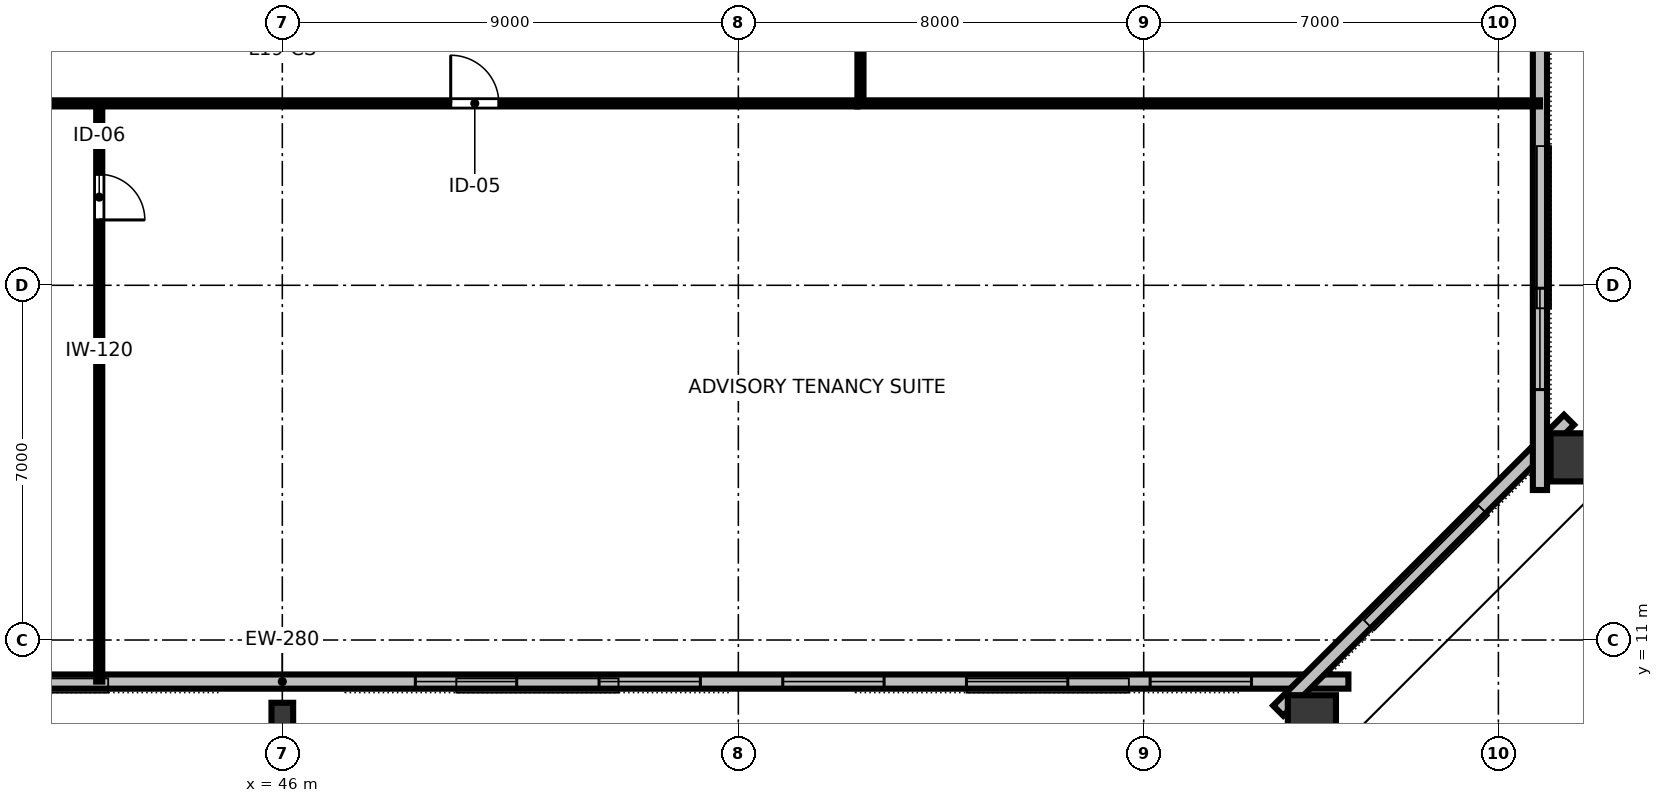
"""IFC4 building model, lengths in metres.
Left out: names, types, materials, properties, quantities, classifications, styles, units other than length and angle.
Written with IfcOpenShell. Run it as: python <this file> out.ifc"""

import sys

from ifc_helpers import new_model, si_unit, direction, frame, frame_2d, origin, origin_2d, place, context, subcontext, project, spatial, rectangle, hollow_rectangle, i_section, extrude, element, fill, save


model = new_model("IFC4")
c1 = context("Model", 3, precision=1e-05, world=origin(), true_north=direction((0.0, 1.0)))
c2 = subcontext(c1, "Body", "Model", "MODEL_VIEW")
j1 = project(units=[si_unit("LENGTHUNIT", "METRE"), si_unit("PLANEANGLEUNIT", "RADIAN")], contexts=[c1])
p1 = place(None, origin())
s1 = spatial("IfcSite", under=j1, at=p1, CompositionType="ELEMENT")
p2 = place(p1, origin())
s2 = spatial("IfcBuilding", under=s1, at=p2, CompositionType="ELEMENT")
p3 = place(p2, frame((0.0, 0.0, 74.8)))
s3 = spatial("IfcBuildingStorey", under=s2, at=p3, CompositionType="ELEMENT", Elevation=74.8)
p4 = place(p3, frame((46.0, 9.52, 0.0), z_axis=(0.0, 0.0, 1.0), x_axis=(1.0, 0.0, 0.0)))
e1 = element("IfcColumn", 1, at=p4, inside=s3, PredefinedType="COLUMN", context=c2, shape_type="SweptSolid", body=[
    extrude(i_section(OverallWidth=0.428, OverallDepth=0.483, WebThickness=0.051, FlangeThickness=0.082, FilletRadius=0.025, at=origin_2d()), origin(), (0.0, 0.0, 1.0), 3.358),
])
for number, where, z_axis, x_axis in (
    (2, (66.319, 9.336, 0.0), (0.0, 0.0, 1.0), (1.0, 0.0, 0.0)),
    (3, (71.604, 14.604, 0.0), (0.0, 0.0, 1.0), (0.0, 1.0, 0.0)),
):
    element("IfcColumn", number, at=place(p3, frame(where, z_axis=z_axis, x_axis=x_axis)), inside=s3, PredefinedType="COLUMN", context=c2, shape_type="SweptSolid", body=[
        extrude(hollow_rectangle(XDim=0.95, YDim=1.15, WallThickness=0.06, at=origin_2d()), origin(), (0.0, 0.0, 1.0), 3.358),
    ])
p5 = place(p3, frame((24.96, 10.18, 0.0), z_axis=(0.0, 0.0, 1.0), x_axis=(1.0, 0.0, 0.0)))
e4 = element("IfcWall", 4, at=p5, inside=s3, PredefinedType="STANDARD", context=c2, shape_type="SweptSolid", body=[
    extrude(rectangle(XDim=42.08, YDim=0.28, at=frame_2d((21.04, 0.0))), origin(), (0.0, 0.0, 1.0), 3.36),
])
p6 = place(p5, frame((1.913, 0.0, 0.8)))
e5 = element("IfcOpeningElement", 5, at=p6, cuts=e4, PredefinedType="OPENING", context=c2, shape_type="SweptSolid", body=[
    extrude(rectangle(XDim=2.0, YDim=1.95, at=frame_2d((1.0, 0.975))), frame((0.0, 0.15, 0.0), z_axis=(0.0, -1.0, 0.0), x_axis=(1.0, 0.0, 0.0)), (0.0, 0.0, 1.0), 0.3),
])
p7 = place(p5, frame((5.538, 0.0, 0.8)))
e6 = element("IfcOpeningElement", 6, at=p7, cuts=e4, PredefinedType="OPENING", context=c2, shape_type="SweptSolid", body=[
    extrude(rectangle(XDim=2.0, YDim=1.95, at=frame_2d((1.0, 0.975))), frame((0.0, 0.15, 0.0), z_axis=(0.0, -1.0, 0.0), x_axis=(1.0, 0.0, 0.0)), (0.0, 0.0, 1.0), 0.3),
])
p8 = place(p5, frame((9.164, 0.0, 0.8)))
e7 = element("IfcOpeningElement", 7, at=p8, cuts=e4, PredefinedType="OPENING", context=c2, shape_type="SweptSolid", body=[
    extrude(rectangle(XDim=2.0, YDim=1.95, at=frame_2d((1.0, 0.975))), frame((0.0, 0.15, 0.0), z_axis=(0.0, -1.0, 0.0), x_axis=(1.0, 0.0, 0.0)), (0.0, 0.0, 1.0), 0.3),
])
p9 = place(p5, frame((12.789, 0.0, 0.8)))
e8 = element("IfcOpeningElement", 8, at=p9, cuts=e4, PredefinedType="OPENING", context=c2, shape_type="SweptSolid", body=[
    extrude(rectangle(XDim=2.0, YDim=1.95, at=frame_2d((1.0, 0.975))), frame((0.0, 0.15, 0.0), z_axis=(0.0, -1.0, 0.0), x_axis=(1.0, 0.0, 0.0)), (0.0, 0.0, 1.0), 0.3),
])
p10 = place(p5, frame((23.666, 0.0, 0.8)))
e9 = element("IfcOpeningElement", 9, at=p10, cuts=e4, PredefinedType="OPENING", context=c2, shape_type="SweptSolid", body=[
    extrude(rectangle(XDim=2.0, YDim=1.95, at=frame_2d((1.0, 0.975))), frame((0.0, 0.15, 0.0), z_axis=(0.0, -1.0, 0.0), x_axis=(1.0, 0.0, 0.0)), (0.0, 0.0, 1.0), 0.3),
])
p11 = place(p5, frame((27.291, 0.0, 0.8)))
e10 = element("IfcOpeningElement", 10, at=p11, cuts=e4, PredefinedType="OPENING", context=c2, shape_type="SweptSolid", body=[
    extrude(rectangle(XDim=2.0, YDim=1.95, at=frame_2d((1.0, 0.975))), frame((0.0, 0.15, 0.0), z_axis=(0.0, -1.0, 0.0), x_axis=(1.0, 0.0, 0.0)), (0.0, 0.0, 1.0), 0.3),
])
p12 = place(p5, frame((30.917, 0.0, 0.8)))
e11 = element("IfcOpeningElement", 11, at=p12, cuts=e4, PredefinedType="OPENING", context=c2, shape_type="SweptSolid", body=[
    extrude(rectangle(XDim=2.0, YDim=1.95, at=frame_2d((1.0, 0.975))), frame((0.0, 0.15, 0.0), z_axis=(0.0, -1.0, 0.0), x_axis=(1.0, 0.0, 0.0)), (0.0, 0.0, 1.0), 0.3),
])
p13 = place(p5, frame((34.542, 0.0, 0.8)))
e12 = element("IfcOpeningElement", 12, at=p13, cuts=e4, PredefinedType="OPENING", context=c2, shape_type="SweptSolid", body=[
    extrude(rectangle(XDim=2.0, YDim=1.95, at=frame_2d((1.0, 0.975))), frame((0.0, 0.15, 0.0), z_axis=(0.0, -1.0, 0.0), x_axis=(1.0, 0.0, 0.0)), (0.0, 0.0, 1.0), 0.3),
])
p14 = place(p5, frame((38.167, 0.0, 0.8)))
e13 = element("IfcOpeningElement", 13, at=p14, cuts=e4, PredefinedType="OPENING", context=c2, shape_type="SweptSolid", body=[
    extrude(rectangle(XDim=2.0, YDim=1.95, at=frame_2d((1.0, 0.975))), frame((0.0, 0.15, 0.0), z_axis=(0.0, -1.0, 0.0), x_axis=(1.0, 0.0, 0.0)), (0.0, 0.0, 1.0), 0.3),
])
p15 = place(p3, frame((65.655, 9.606, 0.0), z_axis=(0.0, 0.0, 1.0), x_axis=(0.707106781187, 0.707106781187, 0.0)))
e14 = element("IfcWall", 14, at=p15, inside=s3, PredefinedType="STANDARD", context=c2, shape_type="SweptSolid", body=[
    extrude(rectangle(XDim=8.116, YDim=0.28, at=frame_2d((4.058, 0.0))), origin(), (0.0, 0.0, 1.0), 3.36),
])
p16 = place(p3, frame((70.82, 13.96, 0.0), z_axis=(0.0, 0.0, 1.0), x_axis=(0.0, 1.0, 0.0)))
e15 = element("IfcWall", 15, at=p16, inside=s3, PredefinedType="STANDARD", context=c2, shape_type="SweptSolid", body=[
    extrude(rectangle(XDim=36.08, YDim=0.28, at=frame_2d((18.04, 0.0))), origin(), (0.0, 0.0, 1.0), 3.36),
])
p17 = place(p16, frame((1.982, 0.0, 0.8)))
e16 = element("IfcOpeningElement", 16, at=p17, cuts=e15, PredefinedType="OPENING", context=c2, shape_type="SweptSolid", body=[
    extrude(rectangle(XDim=2.0, YDim=1.95, at=frame_2d((1.0, 0.975))), frame((0.0, 0.15, 0.0), z_axis=(0.0, -1.0, 0.0), x_axis=(1.0, 0.0, 0.0)), (0.0, 0.0, 1.0), 0.3),
])
p18 = place(p16, frame((9.511, 0.0, 0.8)))
e17 = element("IfcOpeningElement", 17, at=p18, cuts=e15, PredefinedType="OPENING", context=c2, shape_type="SweptSolid", body=[
    extrude(rectangle(XDim=2.0, YDim=1.95, at=frame_2d((1.0, 0.975))), frame((0.0, 0.15, 0.0), z_axis=(0.0, -1.0, 0.0), x_axis=(1.0, 0.0, 0.0)), (0.0, 0.0, 1.0), 0.3),
])
p19 = place(p16, frame((13.276, 0.0, 0.8)))
e18 = element("IfcOpeningElement", 18, at=p19, cuts=e15, PredefinedType="OPENING", context=c2, shape_type="SweptSolid", body=[
    extrude(rectangle(XDim=2.0, YDim=1.95, at=frame_2d((1.0, 0.975))), frame((0.0, 0.15, 0.0), z_axis=(0.0, -1.0, 0.0), x_axis=(1.0, 0.0, 0.0)), (0.0, 0.0, 1.0), 0.3),
])
p20 = place(p16, frame((20.804, 0.0, 0.8)))
e19 = element("IfcOpeningElement", 19, at=p20, cuts=e15, PredefinedType="OPENING", context=c2, shape_type="SweptSolid", body=[
    extrude(rectangle(XDim=2.0, YDim=1.95, at=frame_2d((1.0, 0.975))), frame((0.0, 0.15, 0.0), z_axis=(0.0, -1.0, 0.0), x_axis=(1.0, 0.0, 0.0)), (0.0, 0.0, 1.0), 0.3),
])
p21 = place(p16, frame((24.569, 0.0, 0.8)))
e20 = element("IfcOpeningElement", 20, at=p21, cuts=e15, PredefinedType="OPENING", context=c2, shape_type="SweptSolid", body=[
    extrude(rectangle(XDim=2.0, YDim=1.95, at=frame_2d((1.0, 0.975))), frame((0.0, 0.15, 0.0), z_axis=(0.0, -1.0, 0.0), x_axis=(1.0, 0.0, 0.0)), (0.0, 0.0, 1.0), 0.3),
])
p22 = place(p16, frame((32.098, 0.0, 0.8)))
e21 = element("IfcOpeningElement", 21, at=p22, cuts=e15, PredefinedType="OPENING", context=c2, shape_type="SweptSolid", body=[
    extrude(rectangle(XDim=2.0, YDim=1.95, at=frame_2d((1.0, 0.975))), frame((0.0, 0.15, 0.0), z_axis=(0.0, -1.0, 0.0), x_axis=(1.0, 0.0, 0.0)), (0.0, 0.0, 1.0), 0.3),
])
p23 = place(p3, frame((42.387, 21.59, 0.0), z_axis=(0.0, 0.0, 1.0), x_axis=(0.0, -1.0, 0.0)))
e22 = element("IfcWall", 22, at=p23, inside=s3, PredefinedType="PARTITIONING", context=c2, shape_type="SweptSolid", body=[
    extrude(rectangle(XDim=11.41, YDim=0.12, at=frame_2d((5.705, 0.0))), origin(), (0.0, 0.0, 1.0), 2.64),
])
p24 = place(p23, frame((1.4, 0.0, 0.0)))
e23 = element("IfcOpeningElement", 23, at=p24, cuts=e22, PredefinedType="OPENING", context=c2, shape_type="SweptSolid", body=[
    extrude(rectangle(XDim=0.9, YDim=2.15, at=frame_2d((0.45, 1.075))), frame((0.0, 0.07, 0.0), z_axis=(0.0, -1.0, 0.0), x_axis=(1.0, 0.0, 0.0)), (0.0, 0.0, 1.0), 0.14),
])
p25 = place(p3, frame((34.65, 21.59, 0.0), z_axis=(0.0, 0.0, 1.0), x_axis=(1.0, 0.0, 0.0)))
e24 = element("IfcWall", 24, at=p25, inside=s3, PredefinedType="PARTITIONING", context=c2, shape_type="SweptSolid", body=[
    extrude(rectangle(XDim=22.7, YDim=0.12, at=frame_2d((11.35, 0.0))), origin(), (0.0, 0.0, 1.0), 2.64),
])
p26 = place(p25, frame((3.463, 0.0, 0.0)))
e25 = element("IfcOpeningElement", 25, at=p26, cuts=e24, PredefinedType="OPENING", context=c2, shape_type="SweptSolid", body=[
    extrude(rectangle(XDim=0.95, YDim=2.15, at=frame_2d((0.475, 1.075))), frame((0.0, 0.07, 0.0), z_axis=(0.0, -1.0, 0.0), x_axis=(1.0, 0.0, 0.0)), (0.0, 0.0, 1.0), 0.14),
])
p27 = place(p25, frame((14.673, 0.0, 0.0)))
e26 = element("IfcOpeningElement", 26, at=p27, cuts=e24, PredefinedType="OPENING", context=c2, shape_type="SweptSolid", body=[
    extrude(rectangle(XDim=0.95, YDim=2.15, at=frame_2d((0.475, 1.075))), frame((0.0, 0.07, 0.0), z_axis=(0.0, -1.0, 0.0), x_axis=(1.0, 0.0, 0.0)), (0.0, 0.0, 1.0), 0.14),
])
p28 = place(p3, frame((57.41, 21.65, 0.0), z_axis=(0.0, 0.0, 1.0), x_axis=(0.0, 1.0, 0.0)))
e27 = element("IfcWall", 27, at=p28, inside=s3, PredefinedType="PARTITIONING", context=c2, shape_type="SweptSolid", body=[
    extrude(rectangle(XDim=20.7, YDim=0.12, at=frame_2d((10.35, 0.0))), origin(), (0.0, 0.0, 1.0), 2.64),
])
p29 = place(p28, frame((4.931, 0.0, 0.0)))
e28 = element("IfcOpeningElement", 28, at=p29, cuts=e27, PredefinedType="OPENING", context=c2, shape_type="SweptSolid", body=[
    extrude(rectangle(XDim=0.95, YDim=2.15, at=frame_2d((0.475, 1.075))), frame((0.0, 0.07, 0.0), z_axis=(0.0, -1.0, 0.0), x_axis=(1.0, 0.0, 0.0)), (0.0, 0.0, 1.0), 0.14),
])
p30 = place(p28, frame((15.081, 0.0, 0.0)))
e29 = element("IfcOpeningElement", 29, at=p30, cuts=e27, PredefinedType="OPENING", context=c2, shape_type="SweptSolid", body=[
    extrude(rectangle(XDim=0.95, YDim=2.15, at=frame_2d((0.475, 1.075))), frame((0.0, 0.07, 0.0), z_axis=(0.0, -1.0, 0.0), x_axis=(1.0, 0.0, 0.0)), (0.0, 0.0, 1.0), 0.14),
])
p31 = place(p3, frame((57.35, 21.59, 0.0), z_axis=(0.0, 0.0, 1.0), x_axis=(1.0, 0.0, 0.0)))
e30 = element("IfcWall", 30, at=p31, inside=s3, PredefinedType="PARTITIONING", context=c2, shape_type="SweptSolid", body=[
    extrude(rectangle(XDim=13.47, YDim=0.12, at=frame_2d((6.735, 0.0))), origin(), (0.0, 0.0, 1.0), 2.64),
])
p32 = place(p10, origin())
e31 = element("IfcWindow", 31, at=p32, inside=s3, PartitioningType="SINGLE_PANEL", PredefinedType="WINDOW", context=c2, shape_type="SweptSolid", body=[
    extrude(rectangle(XDim=2.0, YDim=1.95, at=frame_2d((1.0, 0.975))), frame((0.0, 0.03, 0.0), z_axis=(0.0, -1.0, 0.0), x_axis=(1.0, 0.0, 0.0)), (0.0, 0.0, 1.0), 0.06),
])
fill(e9, e31)
p33 = place(p11, origin())
e32 = element("IfcWindow", 32, at=p33, inside=s3, PartitioningType="SINGLE_PANEL", PredefinedType="WINDOW", context=c2, shape_type="SweptSolid", body=[
    extrude(rectangle(XDim=2.0, YDim=1.95, at=frame_2d((1.0, 0.975))), frame((0.0, 0.03, 0.0), z_axis=(0.0, -1.0, 0.0), x_axis=(1.0, 0.0, 0.0)), (0.0, 0.0, 1.0), 0.06),
])
fill(e10, e32)
p34 = place(p12, origin())
e33 = element("IfcWindow", 33, at=p34, inside=s3, PartitioningType="SINGLE_PANEL", PredefinedType="WINDOW", context=c2, shape_type="SweptSolid", body=[
    extrude(rectangle(XDim=2.0, YDim=1.95, at=frame_2d((1.0, 0.975))), frame((0.0, 0.03, 0.0), z_axis=(0.0, -1.0, 0.0), x_axis=(1.0, 0.0, 0.0)), (0.0, 0.0, 1.0), 0.06),
])
fill(e11, e33)
p35 = place(p13, origin())
e34 = element("IfcWindow", 34, at=p35, inside=s3, PartitioningType="SINGLE_PANEL", PredefinedType="WINDOW", context=c2, shape_type="SweptSolid", body=[
    extrude(rectangle(XDim=2.0, YDim=1.95, at=frame_2d((1.0, 0.975))), frame((0.0, 0.03, 0.0), z_axis=(0.0, -1.0, 0.0), x_axis=(1.0, 0.0, 0.0)), (0.0, 0.0, 1.0), 0.06),
])
fill(e12, e34)
p36 = place(p14, origin())
e35 = element("IfcWindow", 35, at=p36, inside=s3, PartitioningType="SINGLE_PANEL", PredefinedType="WINDOW", context=c2, shape_type="SweptSolid", body=[
    extrude(rectangle(XDim=2.0, YDim=1.95, at=frame_2d((1.0, 0.975))), frame((0.0, 0.03, 0.0), z_axis=(0.0, -1.0, 0.0), x_axis=(1.0, 0.0, 0.0)), (0.0, 0.0, 1.0), 0.06),
])
fill(e13, e35)
p37 = place(p17, origin())
e36 = element("IfcWindow", 36, at=p37, inside=s3, PartitioningType="SINGLE_PANEL", PredefinedType="WINDOW", context=c2, shape_type="SweptSolid", body=[
    extrude(rectangle(XDim=2.0, YDim=1.95, at=frame_2d((1.0, 0.975))), frame((0.0, 0.03, 0.0), z_axis=(0.0, -1.0, 0.0), x_axis=(1.0, 0.0, 0.0)), (0.0, 0.0, 1.0), 0.06),
])
fill(e16, e36)
p38 = place(p24, origin())
e37 = element("IfcDoor", 37, at=p38, inside=s3, OperationType="SINGLE_SWING_RIGHT", PredefinedType="DOOR", context=c2, shape_type="SweptSolid", body=[
    extrude(rectangle(XDim=0.9, YDim=2.15, at=frame_2d((0.45, 1.075))), frame((0.0, 0.025, 0.0), z_axis=(0.0, -1.0, 0.0), x_axis=(1.0, 0.0, 0.0)), (0.0, 0.0, 1.0), 0.05),
])
fill(e23, e37)
p39 = place(p27, origin())
e38 = element("IfcDoor", 38, at=p39, inside=s3, OperationType="SINGLE_SWING_LEFT", PredefinedType="DOOR", context=c2, shape_type="SweptSolid", body=[
    extrude(rectangle(XDim=0.95, YDim=2.15, at=frame_2d((0.475, 1.075))), frame((0.0, 0.025, 0.0), z_axis=(0.0, -1.0, 0.0), x_axis=(1.0, 0.0, 0.0)), (0.0, 0.0, 1.0), 0.05),
])
fill(e26, e38)
save(model, sys.argv[1])
